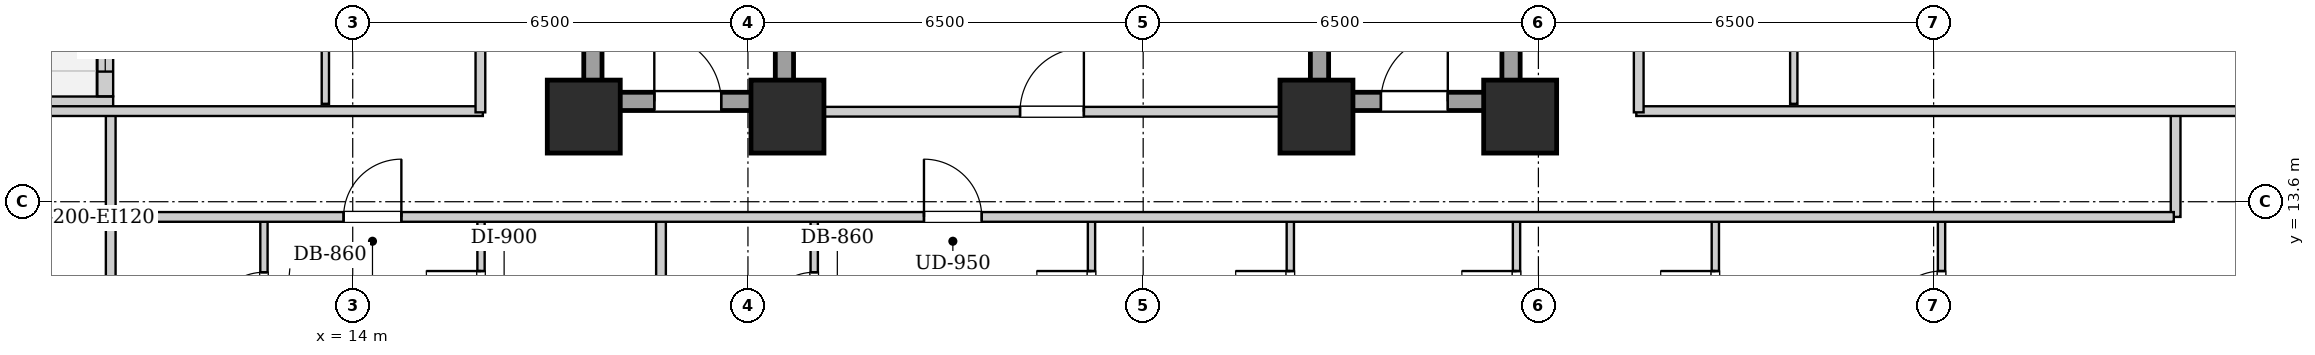
"""IFC4 building model, lengths in metres.
Left out: names, types, materials, properties, quantities, classifications, styles, units other than length and angle.
Written with IfcOpenShell. Run it as: python <this file> out.ifc"""

import sys

from ifc_helpers import new_model, si_unit, direction, frame, frame_2d, origin, origin_2d, place, context, subcontext, project, spatial, rectangle, extrude, element, fill, save


model = new_model("IFC4")
c1 = context("Model", 3, precision=1e-05, world=origin(), true_north=direction((0.0, 1.0)))
c2 = subcontext(c1, "Body", "Model", "MODEL_VIEW")
j1 = project(units=[si_unit("LENGTHUNIT", "METRE"), si_unit("PLANEANGLEUNIT", "RADIAN")], contexts=[c1])
p1 = place(None, origin())
s1 = spatial("IfcSite", under=j1, at=p1, CompositionType="ELEMENT")
p2 = place(p1, origin())
s2 = spatial("IfcBuilding", under=s1, at=p2, CompositionType="ELEMENT")
p3 = place(p2, frame((0.0, 0.0, 41.8)))
s3 = spatial("IfcBuildingStorey", under=s2, at=p3, CompositionType="ELEMENT", Elevation=41.8)
for number, where, z_axis, x_axis in (
    (1, (17.8, 15.0, 0.0), (0.0, 0.0, 1.0), (1.0, 0.0, 0.0)),
    (2, (21.15, 15.0, 0.0), (0.0, 0.0, 1.0), (1.0, 0.0, 0.0)),
    (3, (29.85, 15.0, 0.0), (0.0, 0.0, 1.0), (1.0, 0.0, 0.0)),
    (4, (33.2, 15.0, 0.0), (0.0, 0.0, 1.0), (1.0, 0.0, 0.0)),
):
    element("IfcColumn", number, at=place(p3, frame(where, z_axis=z_axis, x_axis=x_axis)), inside=s3, PredefinedType="COLUMN", context=c2, shape_type="SweptSolid", body=[
        extrude(rectangle(XDim=1.2, YDim=1.2, at=origin_2d()), origin(), (0.0, 0.0, 1.0), 3.2),
    ])
p4 = place(p3, frame((7.66, 15.2, 0.0), z_axis=(0.0, 0.0, 1.0), x_axis=(1.0, 0.0, 0.0)))
e5 = element("IfcWall", 5, at=p4, inside=s3, PredefinedType="SOLIDWALL", context=c2, shape_type="SweptSolid", body=[
    extrude(rectangle(XDim=2.4, YDim=0.26, at=frame_2d((1.2, 0.0))), origin(), (0.0, 0.0, 1.0), 2.94),
])
p5 = place(p3, frame((9.93, 15.334, 0.0), z_axis=(0.0, 0.0, 1.0), x_axis=(0.0, 1.0, 0.0)))
e6 = element("IfcWall", 6, at=p5, inside=s3, PredefinedType="SOLIDWALL", context=c2, shape_type="SweptSolid", body=[
    extrude(rectangle(XDim=3.932, YDim=0.26, at=frame_2d((1.966, 0.0))), origin(), (0.0, 0.0, 1.0), 2.94),
])
p6 = place(p5, frame((1.416, 0.0, 0.0)))
e7 = element("IfcOpeningElement", 7, at=p6, cuts=e6, PredefinedType="OPENING", context=c2, shape_type="SweptSolid", body=[
    extrude(rectangle(XDim=1.1, YDim=2.0, at=frame_2d((0.55, 1.0))), frame((0.0, 0.14, 0.0), z_axis=(0.0, -1.0, 0.0), x_axis=(1.0, 0.0, 0.0)), (0.0, 0.0, 1.0), 0.28),
])
p7 = place(p5, frame((0.406, 0.0, 0.55)))
e8 = element("IfcOpeningElement", 8, at=p7, cuts=e6, PredefinedType="OPENING", context=c2, shape_type="SweptSolid", body=[
    extrude(rectangle(XDim=0.85, YDim=1.2, at=frame_2d((0.425, 0.6))), frame((0.0, 0.14, 0.0), z_axis=(0.0, -1.0, 0.0), x_axis=(1.0, 0.0, 0.0)), (0.0, 0.0, 1.0), 0.28),
])
for number, where, z_axis, x_axis in (
    (9, (17.95, 15.1, 0.0), (0.0, 0.0, 1.0), (0.0, 1.0, 0.0)),
    (10, (21.1, 15.1, 0.0), (0.0, 0.0, 1.0), (0.0, 1.0, 0.0)),
):
    element("IfcWall", number, at=place(p3, frame(where, z_axis=z_axis, x_axis=x_axis)), inside=s3, PredefinedType="SHEAR", context=c2, shape_type="SweptSolid", body=[
        extrude(rectangle(XDim=9.0, YDim=0.3, at=frame_2d((4.5, 0.0))), origin(), (0.0, 0.0, 1.0), 2.94),
    ])
p8 = place(p3, frame((18.1, 15.25, 0.0), z_axis=(0.0, 0.0, 1.0), x_axis=(1.0, 0.0, 0.0)))
e11 = element("IfcWall", 11, at=p8, inside=s3, PredefinedType="SHEAR", context=c2, shape_type="SweptSolid", body=[
    extrude(rectangle(XDim=2.85, YDim=0.3, at=frame_2d((1.425, 0.0))), origin(), (0.0, 0.0, 1.0), 2.94),
])
p9 = place(p8, frame((0.86, 0.0, 0.0)))
e12 = element("IfcOpeningElement", 12, at=p9, cuts=e11, PredefinedType="OPENING", context=c2, shape_type="SweptSolid", body=[
    extrude(rectangle(XDim=1.1, YDim=2.05, at=frame_2d((0.55, 1.025))), frame((0.0, 0.16, 0.0), z_axis=(0.0, -1.0, 0.0), x_axis=(1.0, 0.0, 0.0)), (0.0, 0.0, 1.0), 0.32),
])
for number, where, z_axis, x_axis in (
    (13, (29.9, 15.1, 0.0), (0.0, 0.0, 1.0), (0.0, 1.0, 0.0)),
    (14, (33.05, 15.1, 0.0), (0.0, 0.0, 1.0), (0.0, 1.0, 0.0)),
):
    element("IfcWall", number, at=place(p3, frame(where, z_axis=z_axis, x_axis=x_axis)), inside=s3, PredefinedType="SHEAR", context=c2, shape_type="SweptSolid", body=[
        extrude(rectangle(XDim=9.0, YDim=0.3, at=frame_2d((4.5, 0.0))), origin(), (0.0, 0.0, 1.0), 2.94),
    ])
p10 = place(p3, frame((30.05, 15.25, 0.0), z_axis=(0.0, 0.0, 1.0), x_axis=(1.0, 0.0, 0.0)))
e15 = element("IfcWall", 15, at=p10, inside=s3, PredefinedType="SHEAR", context=c2, shape_type="SweptSolid", body=[
    extrude(rectangle(XDim=2.85, YDim=0.3, at=frame_2d((1.425, 0.0))), origin(), (0.0, 0.0, 1.0), 2.94),
])
p11 = place(p10, frame((0.86, 0.0, 0.0)))
e16 = element("IfcOpeningElement", 16, at=p11, cuts=e15, PredefinedType="OPENING", context=c2, shape_type="SweptSolid", body=[
    extrude(rectangle(XDim=1.1, YDim=2.05, at=frame_2d((0.55, 1.025))), frame((0.0, 0.16, 0.0), z_axis=(0.0, -1.0, 0.0), x_axis=(1.0, 0.0, 0.0)), (0.0, 0.0, 1.0), 0.32),
])
p12 = place(p3, frame((21.25, 15.08, 0.0), z_axis=(0.0, 0.0, 1.0), x_axis=(1.0, 0.0, 0.0)))
e17 = element("IfcWall", 17, at=p12, inside=s3, PredefinedType="PARTITIONING", context=c2, shape_type="SweptSolid", body=[
    extrude(rectangle(XDim=8.5, YDim=0.16, at=frame_2d((4.25, 0.0))), origin(), (0.0, 0.0, 1.0), 2.155),
])
p13 = place(p12, frame((3.725, 0.0, 0.0)))
e18 = element("IfcOpeningElement", 18, at=p13, cuts=e17, PredefinedType="OPENING", context=c2, shape_type="SweptSolid", body=[
    extrude(rectangle(XDim=1.05, YDim=2.05, at=frame_2d((0.525, 1.025))), frame((0.0, 0.09, 0.0), z_axis=(0.0, -1.0, 0.0), x_axis=(1.0, 0.0, 0.0)), (0.0, 0.0, 1.0), 0.18),
])
for number, where, z_axis, x_axis in (
    (19, (10.02, 13.35, 0.0), (0.0, 0.0, 1.0), (0.0, 1.0, 0.0)),
    (20, (43.98, 13.35, 0.0), (0.0, 0.0, 1.0), (0.0, 1.0, 0.0)),
):
    element("IfcWall", number, at=place(p3, frame(where, z_axis=z_axis, x_axis=x_axis)), inside=s3, PredefinedType="PARTITIONING", context=c2, shape_type="SweptSolid", body=[
        extrude(rectangle(XDim=1.74, YDim=0.16, at=frame_2d((0.87, 0.0))), origin(), (0.0, 0.0, 1.0), 2.94),
    ])
p14 = place(p3, frame((7.78, 15.09, 0.0), z_axis=(0.0, 0.0, 1.0), x_axis=(1.0, 0.0, 0.0)))
e21 = element("IfcWall", 21, at=p14, inside=s3, PredefinedType="PARTITIONING", context=c2, shape_type="SweptSolid", body=[
    extrude(rectangle(XDim=8.36, YDim=0.16, at=frame_2d((4.18, 0.0))), origin(), (0.0, 0.0, 1.0), 2.155),
])
p15 = place(p3, frame((35.11, 15.09, 0.0), z_axis=(0.0, 0.0, 1.0), x_axis=(1.0, 0.0, 0.0)))
e22 = element("IfcWall", 22, at=p15, inside=s3, PredefinedType="PARTITIONING", context=c2, shape_type="SweptSolid", body=[
    extrude(rectangle(XDim=11.11, YDim=0.16, at=frame_2d((5.555, 0.0))), origin(), (0.0, 0.0, 1.0), 2.155),
])
p16 = place(p3, frame((10.02, 10.65, 0.0), z_axis=(0.0, 0.0, 1.0), x_axis=(0.0, 1.0, 0.0)))
e23 = element("IfcWall", 23, at=p16, inside=s3, PredefinedType="PARTITIONING", context=c2, shape_type="SweptSolid", body=[
    extrude(rectangle(XDim=2.66, YDim=0.16, at=frame_2d((1.33, 0.0))), origin(), (0.0, 0.0, 1.0), 2.94),
])
p17 = place(p3, frame((12.54, 10.71, 0.0), z_axis=(0.0, 0.0, 1.0), x_axis=(0.0, 1.0, 0.0)))
e24 = element("IfcWall", 24, at=p17, inside=s3, PredefinedType="PARTITIONING", context=c2, shape_type="SweptSolid", body=[
    extrude(rectangle(XDim=2.6, YDim=0.12, at=frame_2d((1.3, 0.0))), origin(), (0.0, 0.0, 1.0), 2.94),
])
p18 = place(p17, frame((0.87, 0.0, 0.0)))
e25 = element("IfcOpeningElement", 25, at=p18, cuts=e24, PredefinedType="OPENING", context=c2, shape_type="SweptSolid", body=[
    extrude(rectangle(XDim=0.86, YDim=2.05, at=frame_2d((0.43, 1.025))), frame((0.0, 0.07, 0.0), z_axis=(0.0, -1.0, 0.0), x_axis=(1.0, 0.0, 0.0)), (0.0, 0.0, 1.0), 0.14),
])
p19 = place(p3, frame((16.11, 10.71, 0.0), z_axis=(0.0, 0.0, 1.0), x_axis=(0.0, 1.0, 0.0)))
e26 = element("IfcWall", 26, at=p19, inside=s3, PredefinedType="PARTITIONING", context=c2, shape_type="SweptSolid", body=[
    extrude(rectangle(XDim=2.6, YDim=0.12, at=frame_2d((1.3, 0.0))), origin(), (0.0, 0.0, 1.0), 2.94),
])
p20 = place(p19, frame((0.85, 0.0, 0.0)))
e27 = element("IfcOpeningElement", 27, at=p20, cuts=e26, PredefinedType="OPENING", context=c2, shape_type="SweptSolid", body=[
    extrude(rectangle(XDim=0.9, YDim=2.05, at=frame_2d((0.45, 1.025))), frame((0.0, 0.07, 0.0), z_axis=(0.0, -1.0, 0.0), x_axis=(1.0, 0.0, 0.0)), (0.0, 0.0, 1.0), 0.14),
])
p21 = place(p3, frame((19.07, 0.28, 0.0), z_axis=(0.0, 0.0, 1.0), x_axis=(0.0, 1.0, 0.0)))
e28 = element("IfcWall", 28, at=p21, inside=s3, PredefinedType="PARTITIONING", context=c2, shape_type="SweptSolid", body=[
    extrude(rectangle(XDim=13.03, YDim=0.16, at=frame_2d((6.515, 0.0))), origin(), (0.0, 0.0, 1.0), 2.94),
])
p22 = place(p3, frame((21.59, 10.71, 0.0), z_axis=(0.0, 0.0, 1.0), x_axis=(0.0, 1.0, 0.0)))
e29 = element("IfcWall", 29, at=p22, inside=s3, PredefinedType="PARTITIONING", context=c2, shape_type="SweptSolid", body=[
    extrude(rectangle(XDim=2.6, YDim=0.12, at=frame_2d((1.3, 0.0))), origin(), (0.0, 0.0, 1.0), 2.94),
])
p23 = place(p22, frame((0.87, 0.0, 0.0)))
e30 = element("IfcOpeningElement", 30, at=p23, cuts=e29, PredefinedType="OPENING", context=c2, shape_type="SweptSolid", body=[
    extrude(rectangle(XDim=0.86, YDim=2.05, at=frame_2d((0.43, 1.025))), frame((0.0, 0.07, 0.0), z_axis=(0.0, -1.0, 0.0), x_axis=(1.0, 0.0, 0.0)), (0.0, 0.0, 1.0), 0.14),
])
p24 = place(p3, frame((26.15, 10.71, 0.0), z_axis=(0.0, 0.0, 1.0), x_axis=(0.0, 1.0, 0.0)))
e31 = element("IfcWall", 31, at=p24, inside=s3, PredefinedType="PARTITIONING", context=c2, shape_type="SweptSolid", body=[
    extrude(rectangle(XDim=2.6, YDim=0.12, at=frame_2d((1.3, 0.0))), origin(), (0.0, 0.0, 1.0), 2.94),
])
p25 = place(p24, frame((0.85, 0.0, 0.0)))
e32 = element("IfcOpeningElement", 32, at=p25, cuts=e31, PredefinedType="OPENING", context=c2, shape_type="SweptSolid", body=[
    extrude(rectangle(XDim=0.9, YDim=2.05, at=frame_2d((0.45, 1.025))), frame((0.0, 0.07, 0.0), z_axis=(0.0, -1.0, 0.0), x_axis=(1.0, 0.0, 0.0)), (0.0, 0.0, 1.0), 0.14),
])
p26 = place(p3, frame((29.42, 10.71, 0.0), z_axis=(0.0, 0.0, 1.0), x_axis=(0.0, 1.0, 0.0)))
e33 = element("IfcWall", 33, at=p26, inside=s3, PredefinedType="PARTITIONING", context=c2, shape_type="SweptSolid", body=[
    extrude(rectangle(XDim=2.6, YDim=0.12, at=frame_2d((1.3, 0.0))), origin(), (0.0, 0.0, 1.0), 2.94),
])
p27 = place(p26, frame((0.85, 0.0, 0.0)))
e34 = element("IfcOpeningElement", 34, at=p27, cuts=e33, PredefinedType="OPENING", context=c2, shape_type="SweptSolid", body=[
    extrude(rectangle(XDim=0.9, YDim=2.05, at=frame_2d((0.45, 1.025))), frame((0.0, 0.07, 0.0), z_axis=(0.0, -1.0, 0.0), x_axis=(1.0, 0.0, 0.0)), (0.0, 0.0, 1.0), 0.14),
])
p28 = place(p3, frame((33.14, 10.71, 0.0), z_axis=(0.0, 0.0, 1.0), x_axis=(0.0, 1.0, 0.0)))
e35 = element("IfcWall", 35, at=p28, inside=s3, PredefinedType="PARTITIONING", context=c2, shape_type="SweptSolid", body=[
    extrude(rectangle(XDim=2.6, YDim=0.12, at=frame_2d((1.3, 0.0))), origin(), (0.0, 0.0, 1.0), 2.155),
])
p29 = place(p28, frame((0.85, 0.0, 0.0)))
e36 = element("IfcOpeningElement", 36, at=p29, cuts=e35, PredefinedType="OPENING", context=c2, shape_type="SweptSolid", body=[
    extrude(rectangle(XDim=0.9, YDim=2.05, at=frame_2d((0.45, 1.025))), frame((0.0, 0.07, 0.0), z_axis=(0.0, -1.0, 0.0), x_axis=(1.0, 0.0, 0.0)), (0.0, 0.0, 1.0), 0.14),
])
p30 = place(p3, frame((36.41, 10.71, 0.0), z_axis=(0.0, 0.0, 1.0), x_axis=(0.0, 1.0, 0.0)))
e37 = element("IfcWall", 37, at=p30, inside=s3, PredefinedType="PARTITIONING", context=c2, shape_type="SweptSolid", body=[
    extrude(rectangle(XDim=2.6, YDim=0.12, at=frame_2d((1.3, 0.0))), origin(), (0.0, 0.0, 1.0), 2.94),
])
p31 = place(p30, frame((0.85, 0.0, 0.0)))
e38 = element("IfcOpeningElement", 38, at=p31, cuts=e37, PredefinedType="OPENING", context=c2, shape_type="SweptSolid", body=[
    extrude(rectangle(XDim=0.9, YDim=2.05, at=frame_2d((0.45, 1.025))), frame((0.0, 0.07, 0.0), z_axis=(0.0, -1.0, 0.0), x_axis=(1.0, 0.0, 0.0)), (0.0, 0.0, 1.0), 0.14),
])
p32 = place(p3, frame((40.13, 10.71, 0.0), z_axis=(0.0, 0.0, 1.0), x_axis=(0.0, 1.0, 0.0)))
e39 = element("IfcWall", 39, at=p32, inside=s3, PredefinedType="PARTITIONING", context=c2, shape_type="SweptSolid", body=[
    extrude(rectangle(XDim=2.6, YDim=0.12, at=frame_2d((1.3, 0.0))), origin(), (0.0, 0.0, 1.0), 2.94),
])
p33 = place(p32, frame((0.85, 0.0, 0.0)))
e40 = element("IfcOpeningElement", 40, at=p33, cuts=e39, PredefinedType="OPENING", context=c2, shape_type="SweptSolid", body=[
    extrude(rectangle(XDim=0.9, YDim=2.05, at=frame_2d((0.45, 1.025))), frame((0.0, 0.07, 0.0), z_axis=(0.0, -1.0, 0.0), x_axis=(1.0, 0.0, 0.0)), (0.0, 0.0, 1.0), 0.14),
])
p34 = place(p3, frame((13.55, 15.21, 0.0), z_axis=(0.0, 0.0, 1.0), x_axis=(0.0, 1.0, 0.0)))
e41 = element("IfcWall", 41, at=p34, inside=s3, PredefinedType="PARTITIONING", context=c2, shape_type="SweptSolid", body=[
    extrude(rectangle(XDim=1.85, YDim=0.12, at=frame_2d((0.925, 0.0))), origin(), (0.0, 0.0, 1.0), 2.94),
])
p35 = place(p3, frame((37.7, 15.21, 0.0), z_axis=(0.0, 0.0, 1.0), x_axis=(0.0, 1.0, 0.0)))
e42 = element("IfcWall", 42, at=p35, inside=s3, PredefinedType="PARTITIONING", context=c2, shape_type="SweptSolid", body=[
    extrude(rectangle(XDim=2.3, YDim=0.12, at=frame_2d((1.15, 0.0))), origin(), (0.0, 0.0, 1.0), 2.94),
])
p36 = place(p3, frame((10.05, 13.35, 0.0), z_axis=(0.0, 0.0, 1.0), x_axis=(1.0, 0.0, 0.0)))
e43 = element("IfcWall", 43, at=p36, inside=s3, PredefinedType="PARTITIONING", context=c2, shape_type="SweptSolid", body=[
    extrude(rectangle(XDim=33.9, YDim=0.16, at=frame_2d((16.95, 0.0))), origin(), (0.0, 0.0, 1.0), 2.94),
])
p37 = place(p36, frame((3.8, 0.0, 0.0)))
e44 = element("IfcOpeningElement", 44, at=p37, cuts=e43, PredefinedType="OPENING", context=c2, shape_type="SweptSolid", body=[
    extrude(rectangle(XDim=0.95, YDim=2.1, at=frame_2d((0.475, 1.05))), frame((0.0, 0.09, 0.0), z_axis=(0.0, -1.0, 0.0), x_axis=(1.0, 0.0, 0.0)), (0.0, 0.0, 1.0), 0.18),
])
p38 = place(p36, frame((13.345, 0.0, 0.0)))
e45 = element("IfcOpeningElement", 45, at=p38, cuts=e43, PredefinedType="OPENING", context=c2, shape_type="SweptSolid", body=[
    extrude(rectangle(XDim=0.95, YDim=2.1, at=frame_2d((0.475, 1.05))), frame((0.0, 0.09, 0.0), z_axis=(0.0, -1.0, 0.0), x_axis=(1.0, 0.0, 0.0)), (0.0, 0.0, 1.0), 0.18),
])
p39 = place(p3, frame((16.1, 15.07, 0.0), z_axis=(0.0, 0.0, 1.0), x_axis=(0.0, 1.0, 0.0)))
e46 = element("IfcWall", 46, at=p39, inside=s3, PredefinedType="PARTITIONING", context=c2, shape_type="SweptSolid", body=[
    extrude(rectangle(XDim=13.93, YDim=0.16, at=frame_2d((6.965, 0.0))), origin(), (0.0, 0.0, 1.0), 2.94),
])
p40 = place(p39, frame((3.608, 0.0, 0.0)))
e47 = element("IfcOpeningElement", 47, at=p40, cuts=e46, PredefinedType="OPENING", context=c2, shape_type="SweptSolid", body=[
    extrude(rectangle(XDim=0.95, YDim=2.1, at=frame_2d((0.475, 1.05))), frame((0.0, 0.09, 0.0), z_axis=(0.0, -1.0, 0.0), x_axis=(1.0, 0.0, 0.0)), (0.0, 0.0, 1.0), 0.18),
])
p41 = place(p39, frame((10.649, 0.0, 0.0)))
e48 = element("IfcOpeningElement", 48, at=p41, cuts=e46, PredefinedType="OPENING", context=c2, shape_type="SweptSolid", body=[
    extrude(rectangle(XDim=0.95, YDim=2.1, at=frame_2d((0.475, 1.05))), frame((0.0, 0.09, 0.0), z_axis=(0.0, -1.0, 0.0), x_axis=(1.0, 0.0, 0.0)), (0.0, 0.0, 1.0), 0.18),
])
p42 = place(p3, frame((35.15, 15.07, 0.0), z_axis=(0.0, 0.0, 1.0), x_axis=(0.0, 1.0, 0.0)))
e49 = element("IfcWall", 49, at=p42, inside=s3, PredefinedType="PARTITIONING", context=c2, shape_type="SweptSolid", body=[
    extrude(rectangle(XDim=13.93, YDim=0.16, at=frame_2d((6.965, 0.0))), origin(), (0.0, 0.0, 1.0), 2.94),
])
p43 = place(p42, frame((4.385, 0.0, 0.0)))
e50 = element("IfcOpeningElement", 50, at=p43, cuts=e49, PredefinedType="OPENING", context=c2, shape_type="SweptSolid", body=[
    extrude(rectangle(XDim=0.95, YDim=2.1, at=frame_2d((0.475, 1.05))), frame((0.0, 0.09, 0.0), z_axis=(0.0, -1.0, 0.0), x_axis=(1.0, 0.0, 0.0)), (0.0, 0.0, 1.0), 0.18),
])
p44 = place(p9, origin())
e51 = element("IfcDoor", 51, at=p44, inside=s3, OperationType="SINGLE_SWING_LEFT", PredefinedType="DOOR", context=c2, shape_type="SweptSolid", body=[
    extrude(rectangle(XDim=1.1, YDim=2.05, at=frame_2d((0.55, 1.025))), frame((0.0, 0.025, 0.0), z_axis=(0.0, -1.0, 0.0), x_axis=(1.0, 0.0, 0.0)), (0.0, 0.0, 1.0), 0.05),
])
fill(e12, e51)
p45 = place(p11, origin())
e52 = element("IfcDoor", 52, at=p45, inside=s3, OperationType="SINGLE_SWING_RIGHT", PredefinedType="DOOR", context=c2, shape_type="SweptSolid", body=[
    extrude(rectangle(XDim=1.1, YDim=2.05, at=frame_2d((0.55, 1.025))), frame((0.0, 0.025, 0.0), z_axis=(0.0, -1.0, 0.0), x_axis=(1.0, 0.0, 0.0)), (0.0, 0.0, 1.0), 0.05),
])
fill(e16, e52)
p46 = place(p13, origin())
e53 = element("IfcDoor", 53, at=p46, inside=s3, OperationType="SINGLE_SWING_RIGHT", PredefinedType="DOOR", context=c2, shape_type="SweptSolid", body=[
    extrude(rectangle(XDim=1.05, YDim=2.05, at=frame_2d((0.525, 1.025))), frame((0.0, 0.025, 0.0), z_axis=(0.0, -1.0, 0.0), x_axis=(1.0, 0.0, 0.0)), (0.0, 0.0, 1.0), 0.05),
])
fill(e18, e53)
p47 = place(p18, origin())
e54 = element("IfcDoor", 54, at=p47, inside=s3, OperationType="SINGLE_SWING_LEFT", PredefinedType="DOOR", context=c2, shape_type="SweptSolid", body=[
    extrude(rectangle(XDim=0.86, YDim=2.05, at=frame_2d((0.43, 1.025))), frame((0.0, 0.025, 0.0), z_axis=(0.0, -1.0, 0.0), x_axis=(1.0, 0.0, 0.0)), (0.0, 0.0, 1.0), 0.05),
])
fill(e25, e54)
p48 = place(p20, origin())
e55 = element("IfcDoor", 55, at=p48, inside=s3, OperationType="SINGLE_SWING_RIGHT", PredefinedType="DOOR", context=c2, shape_type="SweptSolid", body=[
    extrude(rectangle(XDim=0.9, YDim=2.05, at=frame_2d((0.45, 1.025))), frame((0.0, 0.025, 0.0), z_axis=(0.0, -1.0, 0.0), x_axis=(1.0, 0.0, 0.0)), (0.0, 0.0, 1.0), 0.05),
])
fill(e27, e55)
p49 = place(p23, origin())
e56 = element("IfcDoor", 56, at=p49, inside=s3, OperationType="SINGLE_SWING_LEFT", PredefinedType="DOOR", context=c2, shape_type="SweptSolid", body=[
    extrude(rectangle(XDim=0.86, YDim=2.05, at=frame_2d((0.43, 1.025))), frame((0.0, 0.025, 0.0), z_axis=(0.0, -1.0, 0.0), x_axis=(1.0, 0.0, 0.0)), (0.0, 0.0, 1.0), 0.05),
])
fill(e30, e56)
p50 = place(p25, origin())
e57 = element("IfcDoor", 57, at=p50, inside=s3, OperationType="SINGLE_SWING_RIGHT", PredefinedType="DOOR", context=c2, shape_type="SweptSolid", body=[
    extrude(rectangle(XDim=0.9, YDim=2.05, at=frame_2d((0.45, 1.025))), frame((0.0, 0.025, 0.0), z_axis=(0.0, -1.0, 0.0), x_axis=(1.0, 0.0, 0.0)), (0.0, 0.0, 1.0), 0.05),
])
fill(e32, e57)
p51 = place(p27, origin())
e58 = element("IfcDoor", 58, at=p51, inside=s3, OperationType="SINGLE_SWING_RIGHT", PredefinedType="DOOR", context=c2, shape_type="SweptSolid", body=[
    extrude(rectangle(XDim=0.9, YDim=2.05, at=frame_2d((0.45, 1.025))), frame((0.0, 0.025, 0.0), z_axis=(0.0, -1.0, 0.0), x_axis=(1.0, 0.0, 0.0)), (0.0, 0.0, 1.0), 0.05),
])
fill(e34, e58)
p52 = place(p29, origin())
e59 = element("IfcDoor", 59, at=p52, inside=s3, OperationType="SINGLE_SWING_RIGHT", PredefinedType="DOOR", context=c2, shape_type="SweptSolid", body=[
    extrude(rectangle(XDim=0.9, YDim=2.05, at=frame_2d((0.45, 1.025))), frame((0.0, 0.025, 0.0), z_axis=(0.0, -1.0, 0.0), x_axis=(1.0, 0.0, 0.0)), (0.0, 0.0, 1.0), 0.05),
])
fill(e36, e59)
p53 = place(p31, origin())
e60 = element("IfcDoor", 60, at=p53, inside=s3, OperationType="SINGLE_SWING_RIGHT", PredefinedType="DOOR", context=c2, shape_type="SweptSolid", body=[
    extrude(rectangle(XDim=0.9, YDim=2.05, at=frame_2d((0.45, 1.025))), frame((0.0, 0.025, 0.0), z_axis=(0.0, -1.0, 0.0), x_axis=(1.0, 0.0, 0.0)), (0.0, 0.0, 1.0), 0.05),
])
fill(e38, e60)
p54 = place(p33, origin())
e61 = element("IfcDoor", 61, at=p54, inside=s3, OperationType="SINGLE_SWING_LEFT", PredefinedType="DOOR", context=c2, shape_type="SweptSolid", body=[
    extrude(rectangle(XDim=0.9, YDim=2.05, at=frame_2d((0.45, 1.025))), frame((0.0, 0.025, 0.0), z_axis=(0.0, -1.0, 0.0), x_axis=(1.0, 0.0, 0.0)), (0.0, 0.0, 1.0), 0.05),
])
fill(e40, e61)
p55 = place(p37, origin())
e62 = element("IfcDoor", 62, at=p55, inside=s3, OperationType="SINGLE_SWING_RIGHT", PredefinedType="DOOR", context=c2, shape_type="SweptSolid", body=[
    extrude(rectangle(XDim=0.95, YDim=2.1, at=frame_2d((0.475, 1.05))), frame((0.0, 0.025, 0.0), z_axis=(0.0, -1.0, 0.0), x_axis=(1.0, 0.0, 0.0)), (0.0, 0.0, 1.0), 0.05),
])
fill(e44, e62)
p56 = place(p38, origin())
e63 = element("IfcDoor", 63, at=p56, inside=s3, OperationType="SINGLE_SWING_LEFT", PredefinedType="DOOR", context=c2, shape_type="SweptSolid", body=[
    extrude(rectangle(XDim=0.95, YDim=2.1, at=frame_2d((0.475, 1.05))), frame((0.0, 0.025, 0.0), z_axis=(0.0, -1.0, 0.0), x_axis=(1.0, 0.0, 0.0)), (0.0, 0.0, 1.0), 0.05),
])
fill(e45, e63)
p57 = place(p7, origin())
e64 = element("IfcWindow", 64, at=p57, inside=s3, PartitioningType="SINGLE_PANEL", PredefinedType="WINDOW", context=c2, shape_type="SweptSolid", body=[
    extrude(rectangle(XDim=0.85, YDim=1.2, at=frame_2d((0.425, 0.6))), frame((0.0, 0.03, 0.0), z_axis=(0.0, -1.0, 0.0), x_axis=(1.0, 0.0, 0.0)), (0.0, 0.0, 1.0), 0.06),
])
fill(e8, e64)
save(model, sys.argv[1])
